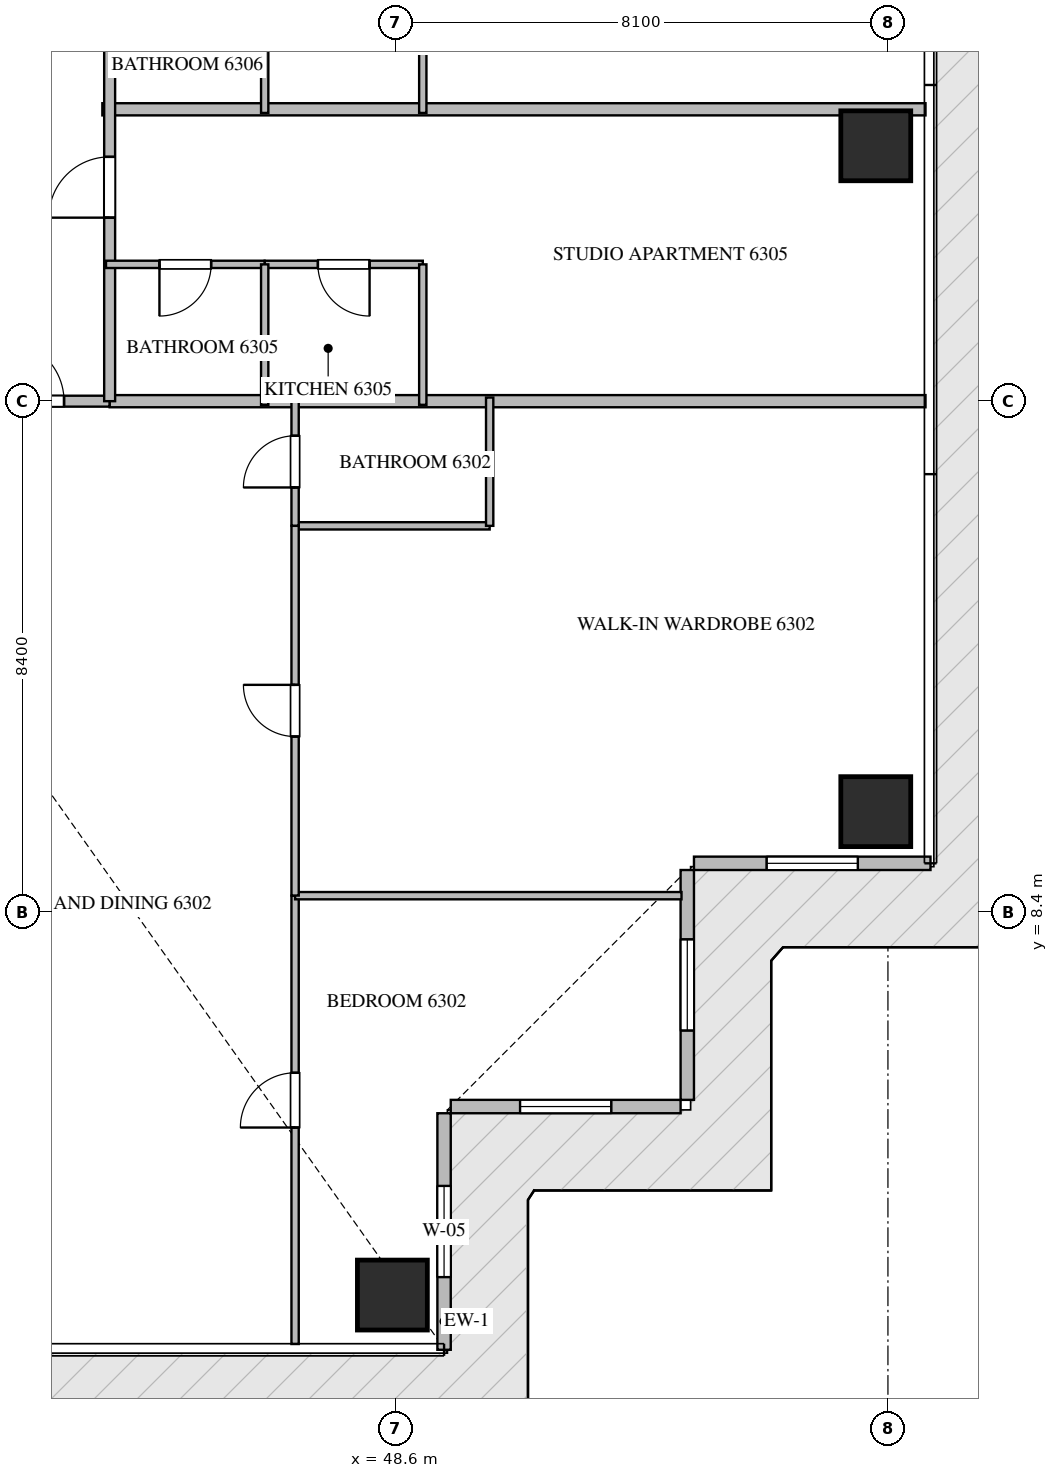
"""IFC4 building model, lengths in metres.
Left out: names, types, materials, properties, quantities, classifications, styles, units other than length and angle.
Written with IfcOpenShell. Run it as: python <this file> out.ifc"""

import sys

from ifc_helpers import new_model, si_unit, direction, frame, frame_2d, origin, origin_2d, place, context, subcontext, project, spatial, rectangle, extrude, source, transform, mapped, element, fill, save


model = new_model("IFC4")
c1 = context("Model", 3, precision=1e-05, world=origin(), true_north=direction((0.0, 1.0)))
c2 = subcontext(c1, "Body", "Model", "MODEL_VIEW")
j1 = project(units=[si_unit("LENGTHUNIT", "METRE"), si_unit("PLANEANGLEUNIT", "RADIAN")], contexts=[c1])
p1 = place(None, origin())
s1 = spatial("IfcSite", under=j1, at=p1, CompositionType="ELEMENT")
p2 = place(p1, origin())
s2 = spatial("IfcBuilding", under=s1, at=p2, CompositionType="ELEMENT")
p3 = place(p2, frame((0.0, 0.0, 252.8)))
s3 = spatial("IfcBuildingStorey", under=s2, at=p3, CompositionType="ELEMENT", Elevation=252.8)
m1 = source(origin(), c2, "Body", "SweptSolid", [
    extrude(rectangle(XDim=1.15, YDim=1.15, at=origin_2d()), origin(), (0.0, 0.0, 1.0), 3.85),
])
for number, where, z_axis, x_axis in (
    (1, (48.55, 2.1, -0.26), (0.0, 0.0, 1.0), (1.0, 0.0, 0.0)),
    (2, (56.5, 10.05, -0.26), (0.0, 0.0, 1.0), (1.0, 0.0, 0.0)),
    (3, (56.5, 21.0, -0.26), (0.0, 0.0, 1.0), (1.0, 0.0, 0.0)),
):
    element("IfcColumn", number, at=place(p3, frame(where, z_axis=z_axis, x_axis=x_axis)), inside=s3, PredefinedType="COLUMN", context=c2, shape_type="MappedRepresentation", body=[
        mapped(m1, transform((0.0, 0.0, 0.0), scale=1.0)),
    ])
p4 = place(p3, frame((49.4, 1.2, 0.0), z_axis=(0.0, 0.0, 1.0), x_axis=(0.0, 1.0, 0.0)))
e4 = element("IfcWall", 4, at=p4, inside=s3, PredefinedType="ELEMENTEDWALL", context=c2, shape_type="SweptSolid", body=[
    extrude(rectangle(XDim=3.89, YDim=0.22, at=frame_2d((1.945, 0.0))), origin(), (0.0, 0.0, 1.0), 3.575),
])
p5 = place(p4, frame((1.195, 0.0, 0.65)))
e5 = element("IfcOpeningElement", 5, at=p5, cuts=e4, PredefinedType="OPENING", context=c2, shape_type="SweptSolid", body=[
    extrude(rectangle(XDim=1.5, YDim=2.25, at=frame_2d((0.75, 1.125))), frame((0.0, 0.12, 0.0), z_axis=(0.0, -1.0, 0.0), x_axis=(1.0, 0.0, 0.0)), (0.0, 0.0, 1.0), 0.24),
])
p6 = place(p3, frame((49.51, 5.2, 0.0), z_axis=(0.0, 0.0, 1.0), x_axis=(1.0, 0.0, 0.0)))
e6 = element("IfcWall", 6, at=p6, inside=s3, PredefinedType="ELEMENTEDWALL", context=c2, shape_type="SweptSolid", body=[
    extrude(rectangle(XDim=3.78, YDim=0.22, at=frame_2d((1.89, 0.0))), origin(), (0.0, 0.0, 1.0), 3.575),
])
p7 = place(p6, frame((1.14, 0.0, 0.65)))
e7 = element("IfcOpeningElement", 7, at=p7, cuts=e6, PredefinedType="OPENING", context=c2, shape_type="SweptSolid", body=[
    extrude(rectangle(XDim=1.5, YDim=2.25, at=frame_2d((0.75, 1.125))), frame((0.0, 0.12, 0.0), z_axis=(0.0, -1.0, 0.0), x_axis=(1.0, 0.0, 0.0)), (0.0, 0.0, 1.0), 0.24),
])
p8 = place(p3, frame((53.4, 5.31, 0.0), z_axis=(0.0, 0.0, 1.0), x_axis=(0.0, 1.0, 0.0)))
e8 = element("IfcWall", 8, at=p8, inside=s3, PredefinedType="ELEMENTEDWALL", context=c2, shape_type="SweptSolid", body=[
    extrude(rectangle(XDim=3.78, YDim=0.22, at=frame_2d((1.89, 0.0))), origin(), (0.0, 0.0, 1.0), 3.575),
])
p9 = place(p8, frame((1.14, 0.0, 0.65)))
e9 = element("IfcOpeningElement", 9, at=p9, cuts=e8, PredefinedType="OPENING", context=c2, shape_type="SweptSolid", body=[
    extrude(rectangle(XDim=1.5, YDim=2.25, at=frame_2d((0.75, 1.125))), frame((0.0, 0.12, 0.0), z_axis=(0.0, -1.0, 0.0), x_axis=(1.0, 0.0, 0.0)), (0.0, 0.0, 1.0), 0.24),
])
p10 = place(p3, frame((53.51, 9.2, 0.0), z_axis=(0.0, 0.0, 1.0), x_axis=(1.0, 0.0, 0.0)))
e10 = element("IfcWall", 10, at=p10, inside=s3, PredefinedType="ELEMENTEDWALL", context=c2, shape_type="SweptSolid", body=[
    extrude(rectangle(XDim=3.89, YDim=0.22, at=frame_2d((1.945, 0.0))), origin(), (0.0, 0.0, 1.0), 3.575),
])
p11 = place(p10, frame((1.195, 0.0, 0.65)))
e11 = element("IfcOpeningElement", 11, at=p11, cuts=e10, PredefinedType="OPENING", context=c2, shape_type="SweptSolid", body=[
    extrude(rectangle(XDim=1.5, YDim=2.25, at=frame_2d((0.75, 1.125))), frame((0.0, 0.12, 0.0), z_axis=(0.0, -1.0, 0.0), x_axis=(1.0, 0.0, 0.0)), (0.0, 0.0, 1.0), 0.24),
])
p12 = place(p3, frame((43.78, 21.6, 0.0), z_axis=(0.0, 0.0, 1.0), x_axis=(1.0, 0.0, 0.0)))
e12 = element("IfcWall", 12, at=p12, inside=s3, PredefinedType="PARTITIONING", context=c2, shape_type="SweptSolid", body=[
    extrude(rectangle(XDim=13.538, YDim=0.2, at=frame_2d((6.769, 0.0))), origin(), (0.0, 0.0, 1.0), 3.59),
])
p13 = place(p3, frame((43.9, 16.8, 0.0), z_axis=(0.0, 0.0, 1.0), x_axis=(1.0, 0.0, 0.0)))
e13 = element("IfcWall", 13, at=p13, inside=s3, PredefinedType="PARTITIONING", context=c2, shape_type="SweptSolid", body=[
    extrude(rectangle(XDim=13.418, YDim=0.2, at=frame_2d((6.709, 0.0))), origin(), (0.0, 0.0, 1.0), 3.59),
])
p14 = place(p3, frame((41.402, 16.8, 0.0), z_axis=(0.0, 0.0, 1.0), x_axis=(1.0, 0.0, 0.0)))
e14 = element("IfcWall", 14, at=p14, inside=s3, PredefinedType="PARTITIONING", context=c2, shape_type="SweptSolid", body=[
    extrude(rectangle(XDim=2.496, YDim=0.18, at=frame_2d((1.248, 0.0))), origin(), (0.0, 0.0, 1.0), 3.59),
])
p15 = place(p14, frame((0.748, 0.0, 0.0)))
e15 = element("IfcOpeningElement", 15, at=p15, cuts=e14, PredefinedType="OPENING", context=c2, shape_type="SweptSolid", body=[
    extrude(rectangle(XDim=1.0, YDim=2.15, at=frame_2d((0.5, 1.075))), frame((0.0, 0.1, 0.0), z_axis=(0.0, -1.0, 0.0), x_axis=(1.0, 0.0, 0.0)), (0.0, 0.0, 1.0), 0.2),
])
p16 = place(p3, frame((43.9, 16.8, 0.0), z_axis=(0.0, 0.0, 1.0), x_axis=(0.0, 1.0, 0.0)))
e16 = element("IfcWall", 16, at=p16, inside=s3, PredefinedType="PARTITIONING", context=c2, shape_type="SweptSolid", body=[
    extrude(rectangle(XDim=16.8, YDim=0.18, at=frame_2d((8.4, 0.0))), origin(), (0.0, 0.0, 1.0), 3.59),
])
p17 = place(p16, frame((3.018, 0.0, 0.0)))
e17 = element("IfcOpeningElement", 17, at=p17, cuts=e16, PredefinedType="OPENING", context=c2, shape_type="SweptSolid", body=[
    extrude(rectangle(XDim=1.0, YDim=2.15, at=frame_2d((0.5, 1.075))), frame((0.0, 0.1, 0.0), z_axis=(0.0, -1.0, 0.0), x_axis=(1.0, 0.0, 0.0)), (0.0, 0.0, 1.0), 0.2),
])
p18 = place(p16, frame((9.18, 0.0, 0.0)))
e18 = element("IfcOpeningElement", 18, at=p18, cuts=e16, PredefinedType="OPENING", context=c2, shape_type="SweptSolid", body=[
    extrude(rectangle(XDim=1.0, YDim=2.15, at=frame_2d((0.5, 1.075))), frame((0.0, 0.1, 0.0), z_axis=(0.0, -1.0, 0.0), x_axis=(1.0, 0.0, 0.0)), (0.0, 0.0, 1.0), 0.2),
])
p19 = place(p16, frame((14.5, 0.0, 0.0)))
e19 = element("IfcOpeningElement", 19, at=p19, cuts=e16, PredefinedType="OPENING", context=c2, shape_type="SweptSolid", body=[
    extrude(rectangle(XDim=1.0, YDim=2.15, at=frame_2d((0.5, 1.075))), frame((0.0, 0.1, 0.0), z_axis=(0.0, -1.0, 0.0), x_axis=(1.0, 0.0, 0.0)), (0.0, 0.0, 1.0), 0.2),
])
p20 = place(p3, frame((46.95, 1.295, 0.0), z_axis=(0.0, 0.0, 1.0), x_axis=(0.0, 1.0, 0.0)))
e20 = element("IfcWall", 20, at=p20, inside=s3, PredefinedType="PARTITIONING", context=c2, shape_type="SweptSolid", body=[
    extrude(rectangle(XDim=7.373, YDim=0.12, at=frame_2d((3.687, 0.0))), origin(), (0.0, 0.0, 1.0), 3.59),
])
p21 = place(p20, frame((3.56, 0.0, 0.0)))
e21 = element("IfcOpeningElement", 21, at=p21, cuts=e20, PredefinedType="OPENING", context=c2, shape_type="SweptSolid", body=[
    extrude(rectangle(XDim=0.9, YDim=2.1, at=frame_2d((0.45, 1.05))), frame((0.0, 0.07, 0.0), z_axis=(0.0, -1.0, 0.0), x_axis=(1.0, 0.0, 0.0)), (0.0, 0.0, 1.0), 0.14),
])
p22 = place(p3, frame((46.95, 8.668, 0.0), z_axis=(0.0, 0.0, 1.0), x_axis=(1.0, 0.0, 0.0)))
e22 = element("IfcWall", 22, at=p22, inside=s3, PredefinedType="PARTITIONING", context=c2, shape_type="SweptSolid", body=[
    extrude(rectangle(XDim=6.355, YDim=0.12, at=frame_2d((3.177, 0.0))), origin(), (0.0, 0.0, 1.0), 3.59),
])
p23 = place(p3, frame((46.95, 14.75, 0.0), z_axis=(0.0, 0.0, 1.0), x_axis=(1.0, 0.0, 0.0)))
e23 = element("IfcWall", 23, at=p23, inside=s3, PredefinedType="PARTITIONING", context=c2, shape_type="SweptSolid", body=[
    extrude(rectangle(XDim=3.2, YDim=0.12, at=frame_2d((1.6, 0.0))), origin(), (0.0, 0.0, 1.0), 3.59),
])
p24 = place(p3, frame((50.15, 14.75, 0.0), z_axis=(0.0, 0.0, 1.0), x_axis=(0.0, 1.0, 0.0)))
e24 = element("IfcWall", 24, at=p24, inside=s3, PredefinedType="PARTITIONING", context=c2, shape_type="SweptSolid", body=[
    extrude(rectangle(XDim=2.11, YDim=0.12, at=frame_2d((1.055, 0.0))), origin(), (0.0, 0.0, 1.0), 3.59),
])
p25 = place(p3, frame((46.95, 8.67, 0.0), z_axis=(0.0, 0.0, 1.0), x_axis=(0.0, 1.0, 0.0)))
e25 = element("IfcWall", 25, at=p25, inside=s3, PredefinedType="PARTITIONING", context=c2, shape_type="SweptSolid", body=[
    extrude(rectangle(XDim=6.08, YDim=0.12, at=frame_2d((3.04, 0.0))), origin(), (0.0, 0.0, 1.0), 3.59),
])
p26 = place(p25, frame((2.615, 0.0, 0.0)))
e26 = element("IfcOpeningElement", 26, at=p26, cuts=e25, PredefinedType="OPENING", context=c2, shape_type="SweptSolid", body=[
    extrude(rectangle(XDim=0.85, YDim=2.1, at=frame_2d((0.425, 1.05))), frame((0.0, 0.07, 0.0), z_axis=(0.0, -1.0, 0.0), x_axis=(1.0, 0.0, 0.0)), (0.0, 0.0, 1.0), 0.14),
])
p27 = place(p3, frame((46.95, 14.752, 0.0), z_axis=(0.0, 0.0, 1.0), x_axis=(0.0, 1.0, 0.0)))
e27 = element("IfcWall", 27, at=p27, inside=s3, PredefinedType="PARTITIONING", context=c2, shape_type="SweptSolid", body=[
    extrude(rectangle(XDim=2.108, YDim=0.12, at=frame_2d((1.054, 0.0))), origin(), (0.0, 0.0, 1.0), 3.59),
])
p28 = place(p27, frame((0.629, 0.0, 0.0)))
e28 = element("IfcOpeningElement", 28, at=p28, cuts=e27, PredefinedType="OPENING", context=c2, shape_type="SweptSolid", body=[
    extrude(rectangle(XDim=0.85, YDim=2.1, at=frame_2d((0.425, 1.05))), frame((0.0, 0.07, 0.0), z_axis=(0.0, -1.0, 0.0), x_axis=(1.0, 0.0, 0.0)), (0.0, 0.0, 1.0), 0.14),
])
p29 = place(p3, frame((49.05, 19.05, 0.0), z_axis=(0.0, 0.0, 1.0), x_axis=(-1.0, 0.0, 0.0)))
e29 = element("IfcWall", 29, at=p29, inside=s3, PredefinedType="PARTITIONING", context=c2, shape_type="SweptSolid", body=[
    extrude(rectangle(XDim=2.6, YDim=0.12, at=frame_2d((1.3, 0.0))), origin(), (0.0, 0.0, 1.0), 3.59),
])
p30 = place(p29, frame((0.875, 0.0, 0.0)))
e30 = element("IfcOpeningElement", 30, at=p30, cuts=e29, PredefinedType="OPENING", context=c2, shape_type="SweptSolid", body=[
    extrude(rectangle(XDim=0.85, YDim=2.1, at=frame_2d((0.425, 1.05))), frame((0.0, 0.07, 0.0), z_axis=(0.0, -1.0, 0.0), x_axis=(1.0, 0.0, 0.0)), (0.0, 0.0, 1.0), 0.14),
])
p31 = place(p3, frame((46.448, 19.05, 0.0), z_axis=(0.0, 0.0, 1.0), x_axis=(-1.0, 0.0, 0.0)))
e31 = element("IfcWall", 31, at=p31, inside=s3, PredefinedType="PARTITIONING", context=c2, shape_type="SweptSolid", body=[
    extrude(rectangle(XDim=2.608, YDim=0.12, at=frame_2d((1.304, 0.0))), origin(), (0.0, 0.0, 1.0), 3.59),
])
p32 = place(p31, frame((0.879, 0.0, 0.0)))
e32 = element("IfcOpeningElement", 32, at=p32, cuts=e31, PredefinedType="OPENING", context=c2, shape_type="SweptSolid", body=[
    extrude(rectangle(XDim=0.85, YDim=2.1, at=frame_2d((0.425, 1.05))), frame((0.0, 0.07, 0.0), z_axis=(0.0, -1.0, 0.0), x_axis=(1.0, 0.0, 0.0)), (0.0, 0.0, 1.0), 0.14),
])
for number, where, z_axis, x_axis in (
    (33, (46.45, 16.74, 0.0), (0.0, 0.0, 1.0), (0.0, 1.0, 0.0)),
    (34, (49.05, 16.74, 0.0), (0.0, 0.0, 1.0), (0.0, 1.0, 0.0)),
):
    element("IfcWall", number, at=place(p3, frame(where, z_axis=z_axis, x_axis=x_axis)), inside=s3, PredefinedType="PARTITIONING", context=c2, shape_type="SweptSolid", body=[
        extrude(rectangle(XDim=2.31, YDim=0.12, at=frame_2d((1.155, 0.0))), origin(), (0.0, 0.0, 1.0), 3.59),
    ])
for number, where, z_axis, x_axis in (
    (35, (46.45, 21.54, 0.0), (0.0, 0.0, 1.0), (0.0, 1.0, 0.0)),
    (36, (49.05, 21.54, 0.0), (0.0, 0.0, 1.0), (0.0, 1.0, 0.0)),
):
    element("IfcWall", number, at=place(p3, frame(where, z_axis=z_axis, x_axis=x_axis)), inside=s3, PredefinedType="PARTITIONING", context=c2, shape_type="SweptSolid", body=[
        extrude(rectangle(XDim=2.81, YDim=0.12, at=frame_2d((1.405, 0.0))), origin(), (0.0, 0.0, 1.0), 3.59),
    ])
m2 = source(origin(), c2, "Body", "SweptSolid", [
    extrude(rectangle(XDim=1.5, YDim=2.25, at=frame_2d((0.75, 1.125))), frame((0.0, 0.03, 0.0), z_axis=(0.0, -1.0, 0.0), x_axis=(1.0, 0.0, 0.0)), (0.0, 0.0, 1.0), 0.06),
])
p33 = place(p5, origin())
e37 = element("IfcWindow", 37, at=p33, inside=s3, PartitioningType="SINGLE_PANEL", PredefinedType="WINDOW", context=c2, shape_type="MappedRepresentation", body=[
    mapped(m2, transform((0.0, 0.0, 0.0), scale=1.0)),
])
fill(e5, e37)
p34 = place(p7, origin())
e38 = element("IfcWindow", 38, at=p34, inside=s3, PartitioningType="SINGLE_PANEL", PredefinedType="WINDOW", context=c2, shape_type="MappedRepresentation", body=[
    mapped(m2, transform((0.0, 0.0, 0.0), scale=1.0)),
])
fill(e7, e38)
p35 = place(p9, origin())
e39 = element("IfcWindow", 39, at=p35, inside=s3, PartitioningType="SINGLE_PANEL", PredefinedType="WINDOW", context=c2, shape_type="MappedRepresentation", body=[
    mapped(m2, transform((0.0, 0.0, 0.0), scale=1.0)),
])
fill(e9, e39)
p36 = place(p11, origin())
e40 = element("IfcWindow", 40, at=p36, inside=s3, PartitioningType="SINGLE_PANEL", PredefinedType="WINDOW", context=c2, shape_type="MappedRepresentation", body=[
    mapped(m2, transform((0.0, 0.0, 0.0), scale=1.0)),
])
fill(e11, e40)
m3 = source(origin(), c2, "Body", "SweptSolid", [
    extrude(rectangle(XDim=1.0, YDim=2.15, at=frame_2d((0.5, 1.075))), frame((0.0, 0.025, 0.0), z_axis=(0.0, -1.0, 0.0), x_axis=(1.0, 0.0, 0.0)), (0.0, 0.0, 1.0), 0.05),
])
p37 = place(p15, origin())
e41 = element("IfcDoor", 41, at=p37, inside=s3, OperationType="SINGLE_SWING_LEFT", PredefinedType="DOOR", context=c2, shape_type="MappedRepresentation", body=[
    mapped(m3, transform((0.0, 0.0, 0.0), scale=1.0)),
])
fill(e15, e41)
p38 = place(p17, origin())
e42 = element("IfcDoor", 42, at=p38, inside=s3, OperationType="SINGLE_SWING_LEFT", PredefinedType="DOOR", context=c2, shape_type="MappedRepresentation", body=[
    mapped(m3, transform((0.0, 0.0, 0.0), scale=1.0)),
])
fill(e17, e42)
m4 = source(origin(), c2, "Body", "SweptSolid", [
    extrude(rectangle(XDim=0.9, YDim=2.1, at=frame_2d((0.45, 1.05))), frame((0.0, 0.025, 0.0), z_axis=(0.0, -1.0, 0.0), x_axis=(1.0, 0.0, 0.0)), (0.0, 0.0, 1.0), 0.05),
])
p39 = place(p21, origin())
e43 = element("IfcDoor", 43, at=p39, inside=s3, OperationType="SINGLE_SWING_LEFT", PredefinedType="DOOR", context=c2, shape_type="MappedRepresentation", body=[
    mapped(m4, transform((0.0, 0.0, 0.0), scale=1.0)),
])
fill(e21, e43)
m5 = source(origin(), c2, "Body", "SweptSolid", [
    extrude(rectangle(XDim=0.85, YDim=2.1, at=frame_2d((0.425, 1.05))), frame((0.0, 0.025, 0.0), z_axis=(0.0, -1.0, 0.0), x_axis=(1.0, 0.0, 0.0)), (0.0, 0.0, 1.0), 0.05),
])
p40 = place(p26, origin())
e44 = element("IfcDoor", 44, at=p40, inside=s3, OperationType="SINGLE_SWING_RIGHT", PredefinedType="DOOR", context=c2, shape_type="MappedRepresentation", body=[
    mapped(m5, transform((0.0, 0.0, 0.0), scale=1.0)),
])
fill(e26, e44)
p41 = place(p28, origin())
e45 = element("IfcDoor", 45, at=p41, inside=s3, OperationType="SINGLE_SWING_LEFT", PredefinedType="DOOR", context=c2, shape_type="MappedRepresentation", body=[
    mapped(m5, transform((0.0, 0.0, 0.0), scale=1.0)),
])
fill(e28, e45)
p42 = place(p30, origin())
e46 = element("IfcDoor", 46, at=p42, inside=s3, OperationType="SINGLE_SWING_LEFT", PredefinedType="DOOR", context=c2, shape_type="MappedRepresentation", body=[
    mapped(m5, transform((0.0, 0.0, 0.0), scale=1.0)),
])
fill(e30, e46)
p43 = place(p32, origin())
e47 = element("IfcDoor", 47, at=p43, inside=s3, OperationType="SINGLE_SWING_RIGHT", PredefinedType="DOOR", context=c2, shape_type="MappedRepresentation", body=[
    mapped(m5, transform((0.0, 0.0, 0.0), scale=1.0)),
])
fill(e32, e47)
save(model, sys.argv[1])
